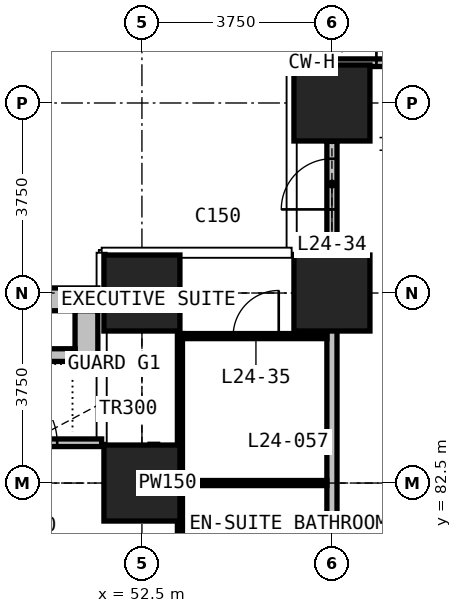
"""IFC4 building model, lengths in metres.
Left out: names, types, materials, properties, quantities, classifications, styles, units other than length and angle.
Written with IfcOpenShell. Run it as: python <this file> out.ifc"""

import sys

from ifc_helpers import new_model, si_unit, direction, frame, frame_2d, origin, origin_2d, place, context, subcontext, project, spatial, rectangle, extrude, element, fill, save


model = new_model("IFC4")
c1 = context("Model", 3, precision=1e-05, world=origin(), true_north=direction((0.0, 1.0)))
c2 = subcontext(c1, "Body", "Model", "MODEL_VIEW")
j1 = project(units=[si_unit("LENGTHUNIT", "METRE"), si_unit("PLANEANGLEUNIT", "RADIAN")], contexts=[c1])
p1 = place(None, origin())
s1 = spatial("IfcSite", under=j1, at=p1, CompositionType="ELEMENT")
p2 = place(p1, origin())
s2 = spatial("IfcBuilding", under=s1, at=p2, CompositionType="ELEMENT")
p3 = place(p2, frame((0.0, 0.0, 98.9)))
s3 = spatial("IfcBuildingStorey", under=s2, at=p3, CompositionType="ELEMENT", Elevation=98.9)
for number, where, z_axis, x_axis in (
    (1, (52.5, 82.5, 0.0), (0.0, 0.0, 1.0), (1.0, 0.0, 0.0)),
    (2, (52.5, 86.25, 0.0), (0.0, 0.0, 1.0), (1.0, 0.0, 0.0)),
    (3, (56.25, 86.25, 0.0), (0.0, 0.0, 1.0), (1.0, 0.0, 0.0)),
    (4, (56.25, 90.0, 0.0), (0.0, 0.0, 1.0), (1.0, 0.0, 0.0)),
):
    element("IfcColumn", number, at=place(p3, frame(where, z_axis=z_axis, x_axis=x_axis)), inside=s3, PredefinedType="COLUMN", context=c2, shape_type="SweptSolid", body=[
        extrude(rectangle(XDim=1.5, YDim=1.5, at=origin_2d()), origin(), (0.0, 0.0, 1.0), 3.3),
    ])
p4 = place(p3, frame((56.25, 90.795, 0.0), z_axis=(0.0, 0.0, 1.0), x_axis=(1.0, 0.0, 0.0)))
e5 = element("IfcWall", 5, at=p4, inside=s3, PredefinedType="SOLIDWALL", context=c2, shape_type="SweptSolid", body=[
    extrude(rectangle(XDim=2.955, YDim=0.15, at=frame_2d((1.478, 0.0))), origin(), (0.0, 0.0, 1.0), 2.95),
])
p5 = place(p4, frame((0.877, 0.0, 0.0)))
e6 = element("IfcOpeningElement", 6, at=p5, cuts=e5, PredefinedType="OPENING", context=c2, shape_type="SweptSolid", body=[
    extrude(rectangle(XDim=1.2, YDim=2.4, at=frame_2d((0.6, 1.2))), frame((0.0, 0.085, 0.0), z_axis=(0.0, -1.0, 0.0), x_axis=(1.0, 0.0, 0.0)), (0.0, 0.0, 1.0), 0.17),
])
p6 = place(p3, frame((48.75, 83.295, 0.0), z_axis=(0.0, 0.0, 1.0), x_axis=(1.0, 0.0, 0.0)))
e7 = element("IfcWall", 7, at=p6, inside=s3, PredefinedType="SOLIDWALL", context=c2, shape_type="SweptSolid", body=[
    extrude(rectangle(XDim=2.955, YDim=0.15, at=frame_2d((1.478, 0.0))), origin(), (0.0, 0.0, 1.0), 2.95),
])
p7 = place(p6, frame((0.877, 0.0, 0.0)))
e8 = element("IfcOpeningElement", 8, at=p7, cuts=e7, PredefinedType="OPENING", context=c2, shape_type="SweptSolid", body=[
    extrude(rectangle(XDim=1.2, YDim=2.4, at=frame_2d((0.6, 1.2))), frame((0.0, 0.085, 0.0), z_axis=(0.0, -1.0, 0.0), x_axis=(1.0, 0.0, 0.0)), (0.0, 0.0, 1.0), 0.17),
])
p8 = place(p3, frame((48.45, 86.125, 0.0), z_axis=(0.0, 0.0, 1.0), x_axis=(1.0, 0.0, 0.0)))
e9 = element("IfcWall", 9, at=p8, inside=s3, PredefinedType="USERDEFINED", context=c2, shape_type="SweptSolid", body=[
    extrude(rectangle(XDim=3.18, YDim=0.45, at=frame_2d((1.59, 0.0))), origin(), (0.0, 0.0, 1.0), 1.1),
])
p9 = place(p3, frame((51.405, 84.9, 0.0), z_axis=(0.0, 0.0, 1.0), x_axis=(0.0, 1.0, 0.0)))
e10 = element("IfcWall", 10, at=p9, inside=s3, PredefinedType="USERDEFINED", context=c2, shape_type="SweptSolid", body=[
    extrude(rectangle(XDim=1.0, YDim=0.45, at=frame_2d((0.5, 0.0))), origin(), (0.0, 0.0, 1.0), 1.1),
])
p10 = place(p3, frame((48.9, 85.025, 0.0), z_axis=(0.0, 0.0, 1.0), x_axis=(1.0, 0.0, 0.0)))
e11 = element("IfcWall", 11, at=p10, inside=s3, PredefinedType="USERDEFINED", context=c2, shape_type="SweptSolid", body=[
    extrude(rectangle(XDim=2.28, YDim=0.25, at=frame_2d((1.14, 0.0))), origin(), (0.0, 0.0, 1.0), 1.0),
])
p11 = place(p3, frame((56.25, 52.4, 0.0), z_axis=(0.0, 0.0, 1.0), x_axis=(0.0, 1.0, 0.0)))
e12 = element("IfcWall", 12, at=p11, inside=s3, PredefinedType="PARTITIONING", context=c2, shape_type="SweptSolid", body=[
    extrude(rectangle(XDim=34.6, YDim=0.2, at=frame_2d((17.3, 0.0))), origin(), (0.0, 0.0, 1.0), 2.95),
])
p12 = place(p11, frame((5.5, 0.0, 0.0)))
e13 = element("IfcOpeningElement", 13, at=p12, cuts=e12, PredefinedType="OPENING", context=c2, shape_type="SweptSolid", body=[
    extrude(rectangle(XDim=1.0, YDim=2.1, at=frame_2d((0.5, 1.05))), frame((0.0, 0.11, 0.0), z_axis=(0.0, -1.0, 0.0), x_axis=(1.0, 0.0, 0.0)), (0.0, 0.0, 1.0), 0.22),
])
p13 = place(p11, frame((8.7, 0.0, 0.0)))
e14 = element("IfcOpeningElement", 14, at=p13, cuts=e12, PredefinedType="OPENING", context=c2, shape_type="SweptSolid", body=[
    extrude(rectangle(XDim=1.0, YDim=2.2, at=frame_2d((0.5, 1.1))), frame((0.0, 0.11, 0.0), z_axis=(0.0, -1.0, 0.0), x_axis=(1.0, 0.0, 0.0)), (0.0, 0.0, 1.0), 0.22),
])
p14 = place(p11, frame((20.5, 0.0, 0.0)))
e15 = element("IfcOpeningElement", 15, at=p14, cuts=e12, PredefinedType="OPENING", context=c2, shape_type="SweptSolid", body=[
    extrude(rectangle(XDim=1.0, YDim=2.2, at=frame_2d((0.5, 1.1))), frame((0.0, 0.11, 0.0), z_axis=(0.0, -1.0, 0.0), x_axis=(1.0, 0.0, 0.0)), (0.0, 0.0, 1.0), 0.22),
])
p15 = place(p11, frame((23.7, 0.0, 0.0)))
e16 = element("IfcOpeningElement", 16, at=p15, cuts=e12, PredefinedType="OPENING", context=c2, shape_type="SweptSolid", body=[
    extrude(rectangle(XDim=1.0, YDim=2.2, at=frame_2d((0.5, 1.1))), frame((0.0, 0.11, 0.0), z_axis=(0.0, -1.0, 0.0), x_axis=(1.0, 0.0, 0.0)), (0.0, 0.0, 1.0), 0.22),
])
p16 = place(p3, frame((56.25, 87.0, 0.0), z_axis=(0.0, 0.0, 1.0), x_axis=(0.0, 1.0, 0.0)))
e17 = element("IfcWall", 17, at=p16, inside=s3, PredefinedType="PARTITIONING", context=c2, shape_type="SweptSolid", body=[
    extrude(rectangle(XDim=2.25, YDim=0.2, at=frame_2d((1.125, 0.0))), origin(), (0.0, 0.0, 1.0), 2.15),
])
p17 = place(p16, frame((0.9, 0.0, 0.0)))
e18 = element("IfcOpeningElement", 18, at=p17, cuts=e17, PredefinedType="OPENING", context=c2, shape_type="SweptSolid", body=[
    extrude(rectangle(XDim=1.0, YDim=2.1, at=frame_2d((0.5, 1.05))), frame((0.0, 0.11, 0.0), z_axis=(0.0, -1.0, 0.0), x_axis=(1.0, 0.0, 0.0)), (0.0, 0.0, 1.0), 0.22),
])
p18 = place(p3, frame((56.25, 89.25, 0.0), z_axis=(0.0, 0.0, 1.0), x_axis=(0.0, 1.0, 0.0)))
e19 = element("IfcWall", 19, at=p18, inside=s3, PredefinedType="PARTITIONING", context=c2, shape_type="SweptSolid", body=[
    extrude(rectangle(XDim=0.825, YDim=0.2, at=frame_2d((0.413, 0.0))), origin(), (0.0, 0.0, 1.0), 2.95),
])
p19 = place(p3, frame((56.25, 90.03, 0.0), z_axis=(0.0, 0.0, 1.0), x_axis=(0.0, 1.0, 0.0)))
e20 = element("IfcWall", 20, at=p19, inside=s3, PredefinedType="PARTITIONING", context=c2, shape_type="SweptSolid", body=[
    extrude(rectangle(XDim=0.615, YDim=0.2, at=frame_2d((0.308, 0.0))), origin(), (0.0, 0.0, 1.0), 2.95),
])
p20 = place(p3, frame((52.81, 82.5, 0.0), z_axis=(0.0, 0.0, 1.0), x_axis=(1.0, 0.0, 0.0)))
e21 = element("IfcWall", 21, at=p20, inside=s3, PredefinedType="PARTITIONING", context=c2, shape_type="SweptSolid", body=[
    extrude(rectangle(XDim=0.39, YDim=0.15, at=frame_2d((0.195, 0.0))), origin(), (0.0, 0.0, 1.0), 2.95),
])
p21 = place(p3, frame((55.605, 90.0, 0.0), z_axis=(0.0, 0.0, 1.0), x_axis=(1.0, 0.0, 0.0)))
e22 = element("IfcWall", 22, at=p21, inside=s3, PredefinedType="PARTITIONING", context=c2, shape_type="SweptSolid", body=[
    extrude(rectangle(XDim=0.545, YDim=0.15, at=frame_2d((0.272, 0.0))), origin(), (0.0, 0.0, 1.0), 2.95),
])
p22 = place(p3, frame((52.735, 82.425, 0.0), z_axis=(0.0, 0.0, 1.0), x_axis=(0.0, 1.0, 0.0)))
e23 = element("IfcWall", 23, at=p22, inside=s3, PredefinedType="PARTITIONING", context=c2, shape_type="SweptSolid", body=[
    extrude(rectangle(XDim=0.84, YDim=0.15, at=frame_2d((0.42, 0.0))), origin(), (0.0, 0.0, 1.0), 2.95),
])
p23 = place(p3, frame((53.3, 82.5, 0.0), z_axis=(0.0, 0.0, 1.0), x_axis=(1.0, 0.0, 0.0)))
e24 = element("IfcWall", 24, at=p23, inside=s3, PredefinedType="PARTITIONING", context=c2, shape_type="SweptSolid", body=[
    extrude(rectangle(XDim=2.85, YDim=0.1, at=frame_2d((1.425, 0.0))), origin(), (0.0, 0.0, 1.0), 2.05),
])
p24 = place(p3, frame((53.3, 85.4, 0.0), z_axis=(0.0, 0.0, 1.0), x_axis=(1.0, 0.0, 0.0)))
e25 = element("IfcWall", 25, at=p24, inside=s3, PredefinedType="PARTITIONING", context=c2, shape_type="SweptSolid", body=[
    extrude(rectangle(XDim=2.85, YDim=0.1, at=frame_2d((1.425, 0.0))), origin(), (0.0, 0.0, 1.0), 2.95),
])
p25 = place(p24, frame((1.0, 0.0, 0.0)))
e26 = element("IfcOpeningElement", 26, at=p25, cuts=e25, PredefinedType="OPENING", context=c2, shape_type="SweptSolid", body=[
    extrude(rectangle(XDim=0.9, YDim=2.2, at=frame_2d((0.45, 1.1))), frame((0.0, 0.06, 0.0), z_axis=(0.0, -1.0, 0.0), x_axis=(1.0, 0.0, 0.0)), (0.0, 0.0, 1.0), 0.12),
])
p26 = place(p3, frame((53.25, 79.55, 0.0), z_axis=(0.0, 0.0, 1.0), x_axis=(0.0, 1.0, 0.0)))
e27 = element("IfcWall", 27, at=p26, inside=s3, PredefinedType="PARTITIONING", context=c2, shape_type="SweptSolid", body=[
    extrude(rectangle(XDim=5.9, YDim=0.1, at=frame_2d((2.95, 0.0))), origin(), (0.0, 0.0, 1.0), 2.95),
])
p27 = place(p5, origin())
e28 = element("IfcDoor", 28, at=p27, inside=s3, OperationType="SINGLE_SWING_LEFT", PredefinedType="DOOR", context=c2, shape_type="SweptSolid", body=[
    extrude(rectangle(XDim=1.2, YDim=2.4, at=frame_2d((0.6, 1.2))), frame((0.0, 0.025, 0.0), z_axis=(0.0, -1.0, 0.0), x_axis=(1.0, 0.0, 0.0)), (0.0, 0.0, 1.0), 0.05),
])
fill(e6, e28)
p28 = place(p7, origin())
e29 = element("IfcDoor", 29, at=p28, inside=s3, OperationType="SINGLE_SWING_LEFT", PredefinedType="DOOR", context=c2, shape_type="SweptSolid", body=[
    extrude(rectangle(XDim=1.2, YDim=2.4, at=frame_2d((0.6, 1.2))), frame((0.0, 0.025, 0.0), z_axis=(0.0, -1.0, 0.0), x_axis=(1.0, 0.0, 0.0)), (0.0, 0.0, 1.0), 0.05),
])
fill(e8, e29)
p29 = place(p17, origin())
e30 = element("IfcDoor", 30, at=p29, inside=s3, OperationType="SINGLE_SWING_LEFT", PredefinedType="DOOR", context=c2, shape_type="SweptSolid", body=[
    extrude(rectangle(XDim=1.0, YDim=2.1, at=frame_2d((0.5, 1.05))), frame((0.0, 0.025, 0.0), z_axis=(0.0, -1.0, 0.0), x_axis=(1.0, 0.0, 0.0)), (0.0, 0.0, 1.0), 0.05),
])
fill(e18, e30)
p30 = place(p25, origin())
e31 = element("IfcDoor", 31, at=p30, inside=s3, OperationType="SINGLE_SWING_RIGHT", PredefinedType="DOOR", context=c2, shape_type="SweptSolid", body=[
    extrude(rectangle(XDim=0.9, YDim=2.2, at=frame_2d((0.45, 1.1))), frame((0.0, 0.025, 0.0), z_axis=(0.0, -1.0, 0.0), x_axis=(1.0, 0.0, 0.0)), (0.0, 0.0, 1.0), 0.05),
])
fill(e26, e31)
save(model, sys.argv[1])
